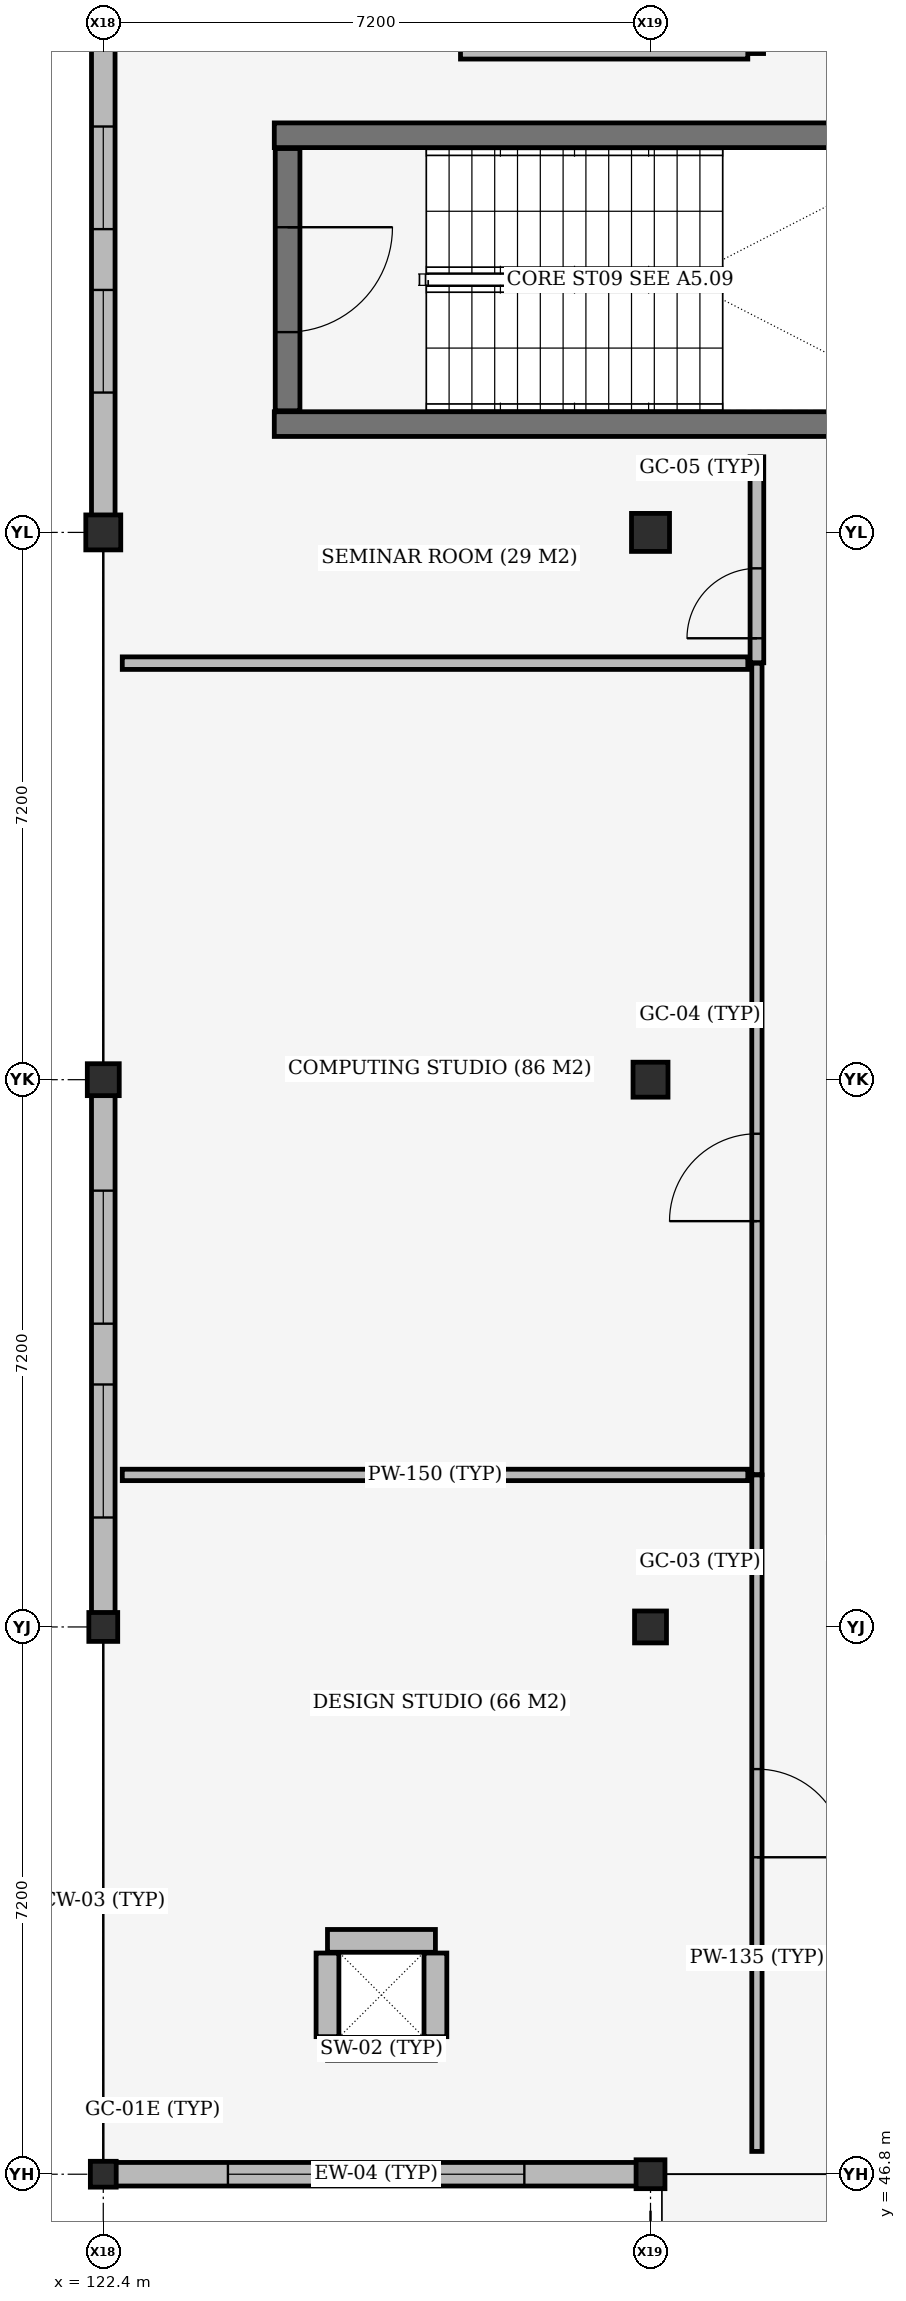
"""IFC4 building model, lengths in metres.
Left out: names, types, materials, properties, quantities, classifications, styles, units other than length and angle.
Written with IfcOpenShell. Run it as: python <this file> out.ifc"""

import sys

from ifc_helpers import new_model, si_unit, direction, frame, frame_2d, origin, origin_2d, place, context, subcontext, project, spatial, rectangle, extrude, element, fill, save


model = new_model("IFC4")
c1 = context("Model", 3, precision=1e-05, world=origin(), true_north=direction((0.0, 1.0)))
c2 = subcontext(c1, "Body", "Model", "MODEL_VIEW")
j1 = project(units=[si_unit("LENGTHUNIT", "METRE"), si_unit("PLANEANGLEUNIT", "RADIAN")], contexts=[c1])
p1 = place(None, origin())
s1 = spatial("IfcSite", under=j1, at=p1, CompositionType="ELEMENT")
p2 = place(p1, origin())
s2 = spatial("IfcBuilding", under=s1, at=p2, CompositionType="ELEMENT")
p3 = place(p2, frame((0.0, 0.0, 13.8)))
s3 = spatial("IfcBuildingStorey", under=s2, at=p3, CompositionType="ELEMENT", Elevation=13.8)
p4 = place(p3, frame((125.35, 48.45, 0.0), z_axis=(0.0, 0.0, 1.0), x_axis=(1.0, 0.0, 0.0)))
e1 = element("IfcWall", 1, at=p4, inside=s3, PredefinedType="SHEAR", context=c2, shape_type="SweptSolid", body=[
    extrude(rectangle(XDim=1.42, YDim=0.3, at=frame_2d((0.71, 0.0))), origin(), (0.0, 0.0, 1.0), 3.96),
])
p5 = place(p3, frame((126.77, 48.61, 0.0), z_axis=(0.0, 0.0, 1.0), x_axis=(0.0, 1.0, 0.0)))
e2 = element("IfcWall", 2, at=p5, inside=s3, PredefinedType="SHEAR", context=c2, shape_type="SweptSolid", body=[
    extrude(rectangle(XDim=1.1, YDim=0.3, at=frame_2d((0.55, 0.0))), origin(), (0.0, 0.0, 1.0), 3.96),
])
p6 = place(p3, frame((126.77, 49.87, 0.0), z_axis=(0.0, 0.0, 1.0), x_axis=(-1.0, 0.0, 0.0)))
e3 = element("IfcWall", 3, at=p6, inside=s3, PredefinedType="SHEAR", context=c2, shape_type="SweptSolid", body=[
    extrude(rectangle(XDim=1.42, YDim=0.3, at=frame_2d((0.71, 0.0))), origin(), (0.0, 0.0, 1.0), 3.96),
])
p7 = place(p3, frame((125.35, 49.71, 0.0), z_axis=(0.0, 0.0, 1.0), x_axis=(0.0, -1.0, 0.0)))
e4 = element("IfcWall", 4, at=p7, inside=s3, PredefinedType="SHEAR", context=c2, shape_type="SweptSolid", body=[
    extrude(rectangle(XDim=1.1, YDim=0.3, at=frame_2d((0.55, 0.0))), origin(), (0.0, 0.0, 1.0), 3.96),
])
p8 = place(p3, frame((122.4, 46.8, 0.0), z_axis=(0.0, 0.0, 1.0), x_axis=(1.0, 0.0, 0.0)))
e5 = element("IfcColumn", 5, at=p8, inside=s3, PredefinedType="COLUMN", context=c2, shape_type="SweptSolid", body=[
    extrude(rectangle(XDim=0.34, YDim=0.34, at=origin_2d()), origin(), (0.0, 0.0, 1.0), 3.96),
])
p9 = place(p3, frame((122.4, 54.0, 0.0), z_axis=(0.0, 0.0, 1.0), x_axis=(1.0, 0.0, 0.0)))
e6 = element("IfcColumn", 6, at=p9, inside=s3, PredefinedType="COLUMN", context=c2, shape_type="SweptSolid", body=[
    extrude(rectangle(XDim=0.38, YDim=0.38, at=origin_2d()), origin(), (0.0, 0.0, 1.0), 3.96),
])
p10 = place(p3, frame((122.4, 61.2, 0.0), z_axis=(0.0, 0.0, 1.0), x_axis=(1.0, 0.0, 0.0)))
e7 = element("IfcColumn", 7, at=p10, inside=s3, PredefinedType="COLUMN", context=c2, shape_type="SweptSolid", body=[
    extrude(rectangle(XDim=0.42, YDim=0.42, at=origin_2d()), origin(), (0.0, 0.0, 1.0), 3.96),
])
p11 = place(p3, frame((122.4, 68.4, 0.0), z_axis=(0.0, 0.0, 1.0), x_axis=(1.0, 0.0, 0.0)))
e8 = element("IfcColumn", 8, at=p11, inside=s3, PredefinedType="COLUMN", context=c2, shape_type="SweptSolid", body=[
    extrude(rectangle(XDim=0.46, YDim=0.46, at=origin_2d()), origin(), (0.0, 0.0, 1.0), 3.935),
])
p12 = place(p3, frame((129.6, 46.8, 0.0), z_axis=(0.0, 0.0, 1.0), x_axis=(1.0, 0.0, 0.0)))
e9 = element("IfcColumn", 9, at=p12, inside=s3, PredefinedType="COLUMN", context=c2, shape_type="SweptSolid", body=[
    extrude(rectangle(XDim=0.38, YDim=0.38, at=origin_2d()), origin(), (0.0, 0.0, 1.0), 3.96),
])
p13 = place(p3, frame((129.6, 54.0, 0.0), z_axis=(0.0, 0.0, 1.0), x_axis=(1.0, 0.0, 0.0)))
e10 = element("IfcColumn", 10, at=p13, inside=s3, PredefinedType="COLUMN", context=c2, shape_type="SweptSolid", body=[
    extrude(rectangle(XDim=0.42, YDim=0.42, at=origin_2d()), origin(), (0.0, 0.0, 1.0), 3.96),
])
p14 = place(p3, frame((129.6, 61.2, 0.0), z_axis=(0.0, 0.0, 1.0), x_axis=(1.0, 0.0, 0.0)))
e11 = element("IfcColumn", 11, at=p14, inside=s3, PredefinedType="COLUMN", context=c2, shape_type="SweptSolid", body=[
    extrude(rectangle(XDim=0.46, YDim=0.46, at=origin_2d()), origin(), (0.0, 0.0, 1.0), 3.96),
])
p15 = place(p3, frame((129.6, 68.4, 0.0), z_axis=(0.0, 0.0, 1.0), x_axis=(1.0, 0.0, 0.0)))
e12 = element("IfcColumn", 12, at=p15, inside=s3, PredefinedType="COLUMN", context=c2, shape_type="SweptSolid", body=[
    extrude(rectangle(XDim=0.5, YDim=0.5, at=origin_2d()), origin(), (0.0, 0.0, 1.0), 3.935),
])
for number, where, z_axis, x_axis in (
    (13, (124.65, 69.825, 0.0), (0.0, 0.0, 1.0), (1.0, 0.0, 0.0)),
    (14, (133.75, 73.625, 0.0), (0.0, 0.0, 1.0), (-1.0, 0.0, 0.0)),
):
    element("IfcWall", number, at=place(p3, frame(where, z_axis=z_axis, x_axis=x_axis)), inside=s3, PredefinedType="SHEAR", context=c2, shape_type="SweptSolid", body=[
        extrude(rectangle(XDim=9.1, YDim=0.325, at=frame_2d((4.55, 0.0))), origin(), (0.0, 0.0, 1.0), 3.935),
    ])
p16 = place(p3, frame((129.418, 46.8, 0.0), z_axis=(0.0, 0.0, 1.0), x_axis=(-1.0, 0.0, 0.0)))
e15 = element("IfcWall", 15, at=p16, inside=s3, PredefinedType="STANDARD", context=c2, shape_type="SweptSolid", body=[
    extrude(rectangle(XDim=6.856, YDim=0.31, at=frame_2d((3.428, 0.0))), origin(), (0.0, 0.0, 1.0), 3.935),
])
p17 = place(p16, frame((1.478, 0.0, 0.85)))
e16 = element("IfcOpeningElement", 16, at=p17, cuts=e15, PredefinedType="OPENING", context=c2, shape_type="SweptSolid", body=[
    extrude(rectangle(XDim=1.55, YDim=2.45, at=frame_2d((0.775, 1.225))), frame((0.0, 0.165, 0.0), z_axis=(0.0, -1.0, 0.0), x_axis=(1.0, 0.0, 0.0)), (0.0, 0.0, 1.0), 0.33),
])
p18 = place(p16, frame((3.828, 0.0, 0.85)))
e17 = element("IfcOpeningElement", 17, at=p18, cuts=e15, PredefinedType="OPENING", context=c2, shape_type="SweptSolid", body=[
    extrude(rectangle(XDim=1.55, YDim=2.45, at=frame_2d((0.775, 1.225))), frame((0.0, 0.165, 0.0), z_axis=(0.0, -1.0, 0.0), x_axis=(1.0, 0.0, 0.0)), (0.0, 0.0, 1.0), 0.33),
])
p19 = place(p3, frame((122.4, 54.182, 0.0), z_axis=(0.0, 0.0, 1.0), x_axis=(0.0, 1.0, 0.0)))
e18 = element("IfcWall", 18, at=p19, inside=s3, PredefinedType="STANDARD", context=c2, shape_type="SweptSolid", body=[
    extrude(rectangle(XDim=6.816, YDim=0.31, at=frame_2d((3.408, 0.0))), origin(), (0.0, 0.0, 1.0), 3.935),
])
p20 = place(p19, frame((1.258, 0.0, 0.85)))
e19 = element("IfcOpeningElement", 19, at=p20, cuts=e18, PredefinedType="OPENING", context=c2, shape_type="SweptSolid", body=[
    extrude(rectangle(XDim=1.75, YDim=2.45, at=frame_2d((0.875, 1.225))), frame((0.0, 0.165, 0.0), z_axis=(0.0, -1.0, 0.0), x_axis=(1.0, 0.0, 0.0)), (0.0, 0.0, 1.0), 0.33),
])
p21 = place(p19, frame((3.808, 0.0, 0.85)))
e20 = element("IfcOpeningElement", 20, at=p21, cuts=e18, PredefinedType="OPENING", context=c2, shape_type="SweptSolid", body=[
    extrude(rectangle(XDim=1.75, YDim=2.45, at=frame_2d((0.875, 1.225))), frame((0.0, 0.165, 0.0), z_axis=(0.0, -1.0, 0.0), x_axis=(1.0, 0.0, 0.0)), (0.0, 0.0, 1.0), 0.33),
])
p22 = place(p3, frame((122.4, 68.622, 0.0), z_axis=(0.0, 0.0, 1.0), x_axis=(0.0, 1.0, 0.0)))
e21 = element("IfcWall", 21, at=p22, inside=s3, PredefinedType="STANDARD", context=c2, shape_type="SweptSolid", body=[
    extrude(rectangle(XDim=6.736, YDim=0.31, at=frame_2d((3.368, 0.0))), origin(), (0.0, 0.0, 1.0), 3.415),
])
p23 = place(p22, frame((1.618, 0.0, 0.95)))
e22 = element("IfcOpeningElement", 22, at=p23, cuts=e21, PredefinedType="OPENING", context=c2, shape_type="SweptSolid", body=[
    extrude(rectangle(XDim=1.35, YDim=2.0, at=frame_2d((0.675, 1.0))), frame((0.0, 0.165, 0.0), z_axis=(0.0, -1.0, 0.0), x_axis=(1.0, 0.0, 0.0)), (0.0, 0.0, 1.0), 0.33),
])
p24 = place(p22, frame((3.768, 0.0, 0.95)))
e23 = element("IfcOpeningElement", 23, at=p24, cuts=e21, PredefinedType="OPENING", context=c2, shape_type="SweptSolid", body=[
    extrude(rectangle(XDim=1.35, YDim=2.0, at=frame_2d((0.675, 1.0))), frame((0.0, 0.165, 0.0), z_axis=(0.0, -1.0, 0.0), x_axis=(1.0, 0.0, 0.0)), (0.0, 0.0, 1.0), 0.33),
])
p25 = place(p3, frame((124.825, 73.45, 0.0), z_axis=(0.0, 0.0, 1.0), x_axis=(0.0, -1.0, 0.0)))
e24 = element("IfcWall", 24, at=p25, inside=s3, PredefinedType="SHEAR", context=c2, shape_type="SweptSolid", body=[
    extrude(rectangle(XDim=3.45, YDim=0.325, at=frame_2d((1.725, 0.0))), origin(), (0.0, 0.0, 1.0), 3.935),
])
p26 = place(p25, frame((1.035, 0.0, 0.0)))
e25 = element("IfcOpeningElement", 25, at=p26, cuts=e24, PredefinedType="OPENING", context=c2, shape_type="SweptSolid", body=[
    extrude(rectangle(XDim=1.38, YDim=2.2, at=frame_2d((0.69, 1.1))), frame((0.0, 0.172, 0.0), z_axis=(0.0, -1.0, 0.0), x_axis=(1.0, 0.0, 0.0)), (0.0, 0.0, 1.0), 0.345),
])
p27 = place(p3, frame((131.0, 74.7, 0.0), z_axis=(0.0, 0.0, 1.0), x_axis=(0.0, 1.0, 0.0)))
e26 = element("IfcWall", 26, at=p27, inside=s3, PredefinedType="PLUMBINGWALL", context=c2, shape_type="SweptSolid", body=[
    extrude(rectangle(XDim=3.5, YDim=0.175, at=frame_2d((1.75, 0.0))), origin(), (0.0, 0.0, 1.0), 3.295),
])
p28 = place(p27, frame((1.69, 0.0, 0.0)))
e27 = element("IfcOpeningElement", 27, at=p28, cuts=e26, PredefinedType="OPENING", context=c2, shape_type="SweptSolid", body=[
    extrude(rectangle(XDim=0.9, YDim=2.1, at=frame_2d((0.45, 1.05))), frame((0.0, 0.097, 0.0), z_axis=(0.0, -1.0, 0.0), x_axis=(1.0, 0.0, 0.0)), (0.0, 0.0, 1.0), 0.195),
])
p29 = place(p3, frame((127.1, 74.7, 0.0), z_axis=(0.0, 0.0, 1.0), x_axis=(1.0, 0.0, 0.0)))
e28 = element("IfcWall", 28, at=p29, inside=s3, PredefinedType="PLUMBINGWALL", context=c2, shape_type="SweptSolid", body=[
    extrude(rectangle(XDim=3.78, YDim=0.145, at=frame_2d((1.89, 0.0))), origin(), (0.0, 0.0, 1.0), 3.935),
])
p30 = place(p3, frame((131.0, 47.1, 0.0), z_axis=(0.0, 0.0, 1.0), x_axis=(0.0, 1.0, 0.0)))
e29 = element("IfcWall", 29, at=p30, inside=s3, PredefinedType="PARTITIONING", context=c2, shape_type="SweptSolid", body=[
    extrude(rectangle(XDim=8.9, YDim=0.135, at=frame_2d((4.45, 0.0))), origin(), (0.0, 0.0, 1.0), 3.935),
])
p31 = place(p30, frame((3.87, 0.0, 0.0)))
e30 = element("IfcOpeningElement", 30, at=p31, cuts=e29, PredefinedType="OPENING", context=c2, shape_type="SweptSolid", body=[
    extrude(rectangle(XDim=1.16, YDim=2.2, at=frame_2d((0.58, 1.1))), frame((0.0, 0.077, 0.0), z_axis=(0.0, -1.0, 0.0), x_axis=(1.0, 0.0, 0.0)), (0.0, 0.0, 1.0), 0.155),
])
p32 = place(p3, frame((122.65, 56.0, 0.0), z_axis=(0.0, 0.0, 1.0), x_axis=(1.0, 0.0, 0.0)))
e31 = element("IfcWall", 31, at=p32, inside=s3, PredefinedType="PARTITIONING", context=c2, shape_type="SweptSolid", body=[
    extrude(rectangle(XDim=8.23, YDim=0.15, at=frame_2d((4.115, 0.0))), origin(), (0.0, 0.0, 1.0), 3.935),
])
p33 = place(p3, frame((131.0, 56.005, 0.0), z_axis=(0.0, 0.0, 1.0), x_axis=(0.0, 1.0, 0.0)))
e32 = element("IfcWall", 32, at=p33, inside=s3, PredefinedType="PARTITIONING", context=c2, shape_type="SweptSolid", body=[
    extrude(rectangle(XDim=10.675, YDim=0.135, at=frame_2d((5.337, 0.0))), origin(), (0.0, 0.0, 1.0), 3.935),
])
p34 = place(p33, frame((3.334, 0.0, 0.0)))
e33 = element("IfcOpeningElement", 33, at=p34, cuts=e32, PredefinedType="OPENING", context=c2, shape_type="SweptSolid", body=[
    extrude(rectangle(XDim=1.15, YDim=2.2, at=frame_2d((0.575, 1.1))), frame((0.0, 0.077, 0.0), z_axis=(0.0, -1.0, 0.0), x_axis=(1.0, 0.0, 0.0)), (0.0, 0.0, 1.0), 0.155),
])
p35 = place(p3, frame((122.65, 66.68, 0.0), z_axis=(0.0, 0.0, 1.0), x_axis=(1.0, 0.0, 0.0)))
e34 = element("IfcWall", 34, at=p35, inside=s3, PredefinedType="PARTITIONING", context=c2, shape_type="SweptSolid", body=[
    extrude(rectangle(XDim=8.23, YDim=0.165, at=frame_2d((4.115, 0.0))), origin(), (0.0, 0.0, 1.0), 3.935),
])
p36 = place(p3, frame((131.0, 66.685, 0.0), z_axis=(0.0, 0.0, 1.0), x_axis=(0.0, 1.0, 0.0)))
e35 = element("IfcWall", 35, at=p36, inside=s3, PredefinedType="PARTITIONING", context=c2, shape_type="SweptSolid", body=[
    extrude(rectangle(XDim=2.71, YDim=0.18, at=frame_2d((1.355, 0.0))), origin(), (0.0, 0.0, 1.0), 3.255),
])
p37 = place(p36, frame((0.322, 0.0, 0.0)))
e36 = element("IfcOpeningElement", 36, at=p37, cuts=e35, PredefinedType="OPENING", context=c2, shape_type="SweptSolid", body=[
    extrude(rectangle(XDim=0.92, YDim=2.1, at=frame_2d((0.46, 1.05))), frame((0.0, 0.1, 0.0), z_axis=(0.0, -1.0, 0.0), x_axis=(1.0, 0.0, 0.0)), (0.0, 0.0, 1.0), 0.2),
])
p38 = place(p17, origin())
e37 = element("IfcWindow", 37, at=p38, inside=s3, PartitioningType="DOUBLE_PANEL_VERTICAL", PredefinedType="WINDOW", context=c2, shape_type="SweptSolid", body=[
    extrude(rectangle(XDim=1.55, YDim=2.45, at=frame_2d((0.775, 1.225))), frame((0.0, 0.03, 0.0), z_axis=(0.0, -1.0, 0.0), x_axis=(1.0, 0.0, 0.0)), (0.0, 0.0, 1.0), 0.06),
])
fill(e16, e37)
p39 = place(p18, origin())
e38 = element("IfcWindow", 38, at=p39, inside=s3, PartitioningType="DOUBLE_PANEL_VERTICAL", PredefinedType="WINDOW", context=c2, shape_type="SweptSolid", body=[
    extrude(rectangle(XDim=1.55, YDim=2.45, at=frame_2d((0.775, 1.225))), frame((0.0, 0.03, 0.0), z_axis=(0.0, -1.0, 0.0), x_axis=(1.0, 0.0, 0.0)), (0.0, 0.0, 1.0), 0.06),
])
fill(e17, e38)
p40 = place(p20, origin())
e39 = element("IfcWindow", 39, at=p40, inside=s3, PartitioningType="DOUBLE_PANEL_VERTICAL", PredefinedType="WINDOW", context=c2, shape_type="SweptSolid", body=[
    extrude(rectangle(XDim=1.75, YDim=2.45, at=frame_2d((0.875, 1.225))), frame((0.0, 0.03, 0.0), z_axis=(0.0, -1.0, 0.0), x_axis=(1.0, 0.0, 0.0)), (0.0, 0.0, 1.0), 0.06),
])
fill(e19, e39)
p41 = place(p21, origin())
e40 = element("IfcWindow", 40, at=p41, inside=s3, PartitioningType="DOUBLE_PANEL_VERTICAL", PredefinedType="WINDOW", context=c2, shape_type="SweptSolid", body=[
    extrude(rectangle(XDim=1.75, YDim=2.45, at=frame_2d((0.875, 1.225))), frame((0.0, 0.03, 0.0), z_axis=(0.0, -1.0, 0.0), x_axis=(1.0, 0.0, 0.0)), (0.0, 0.0, 1.0), 0.06),
])
fill(e20, e40)
p42 = place(p23, origin())
e41 = element("IfcWindow", 41, at=p42, inside=s3, PartitioningType="DOUBLE_PANEL_VERTICAL", PredefinedType="WINDOW", context=c2, shape_type="SweptSolid", body=[
    extrude(rectangle(XDim=1.35, YDim=2.0, at=frame_2d((0.675, 1.0))), frame((0.0, 0.03, 0.0), z_axis=(0.0, -1.0, 0.0), x_axis=(1.0, 0.0, 0.0)), (0.0, 0.0, 1.0), 0.06),
])
fill(e22, e41)
p43 = place(p24, origin())
e42 = element("IfcWindow", 42, at=p43, inside=s3, PartitioningType="DOUBLE_PANEL_VERTICAL", PredefinedType="WINDOW", context=c2, shape_type="SweptSolid", body=[
    extrude(rectangle(XDim=1.35, YDim=2.0, at=frame_2d((0.675, 1.0))), frame((0.0, 0.03, 0.0), z_axis=(0.0, -1.0, 0.0), x_axis=(1.0, 0.0, 0.0)), (0.0, 0.0, 1.0), 0.06),
])
fill(e23, e42)
p44 = place(p26, origin())
e43 = element("IfcDoor", 43, at=p44, inside=s3, OperationType="DOUBLE_DOOR_SINGLE_SWING", PredefinedType="DOOR", context=c2, shape_type="SweptSolid", body=[
    extrude(rectangle(XDim=1.38, YDim=2.2, at=frame_2d((0.69, 1.1))), frame((0.0, 0.025, 0.0), z_axis=(0.0, -1.0, 0.0), x_axis=(1.0, 0.0, 0.0)), (0.0, 0.0, 1.0), 0.05),
])
fill(e25, e43)
p45 = place(p31, origin())
e44 = element("IfcDoor", 44, at=p45, inside=s3, OperationType="SINGLE_SWING_RIGHT", PredefinedType="DOOR", context=c2, shape_type="SweptSolid", body=[
    extrude(rectangle(XDim=1.16, YDim=2.2, at=frame_2d((0.58, 1.1))), frame((0.0, 0.025, 0.0), z_axis=(0.0, -1.0, 0.0), x_axis=(1.0, 0.0, 0.0)), (0.0, 0.0, 1.0), 0.05),
])
fill(e30, e44)
p46 = place(p34, origin())
e45 = element("IfcDoor", 45, at=p46, inside=s3, OperationType="SINGLE_SWING_LEFT", PredefinedType="DOOR", context=c2, shape_type="SweptSolid", body=[
    extrude(rectangle(XDim=1.15, YDim=2.2, at=frame_2d((0.575, 1.1))), frame((0.0, 0.025, 0.0), z_axis=(0.0, -1.0, 0.0), x_axis=(1.0, 0.0, 0.0)), (0.0, 0.0, 1.0), 0.05),
])
fill(e33, e45)
p47 = place(p37, origin())
e46 = element("IfcDoor", 46, at=p47, inside=s3, OperationType="SINGLE_SWING_LEFT", PredefinedType="DOOR", context=c2, shape_type="SweptSolid", body=[
    extrude(rectangle(XDim=0.92, YDim=2.1, at=frame_2d((0.46, 1.05))), frame((0.0, 0.025, 0.0), z_axis=(0.0, -1.0, 0.0), x_axis=(1.0, 0.0, 0.0)), (0.0, 0.0, 1.0), 0.05),
])
fill(e36, e46)
save(model, sys.argv[1])
